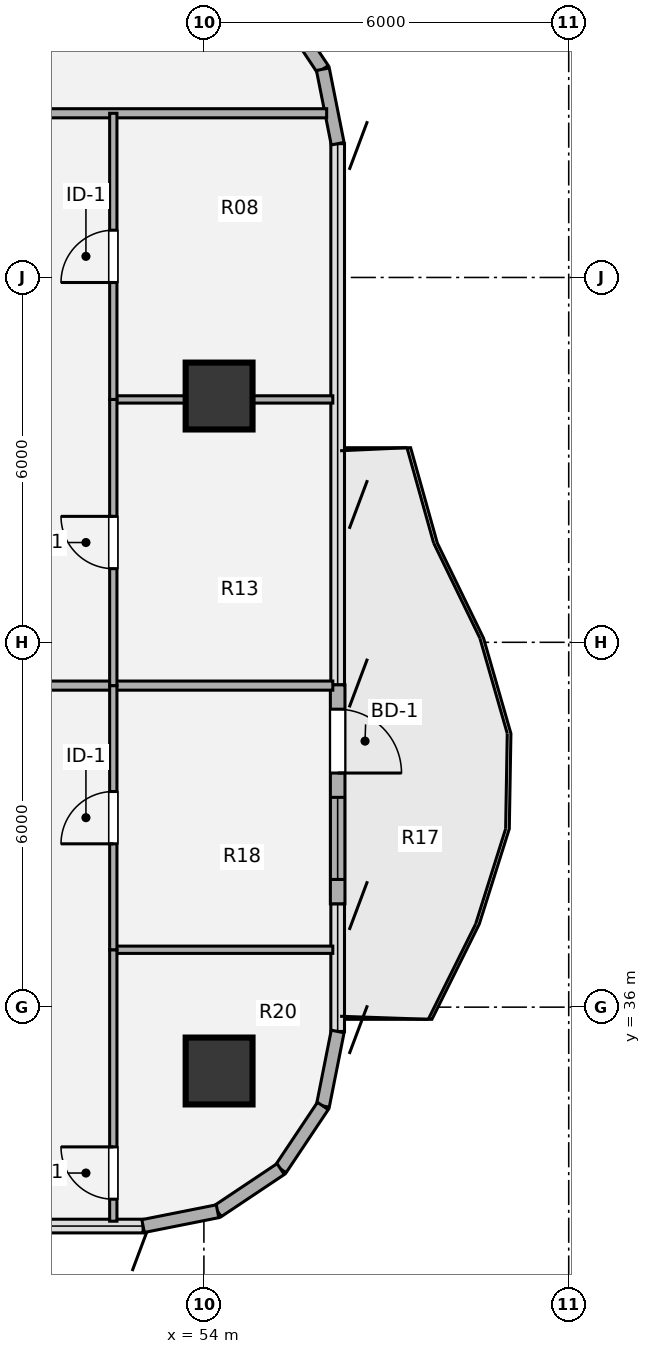
"""IFC4 building model, lengths in metres.
Left out: names, types, materials, properties, quantities, classifications, styles, units other than length and angle.
Written with IfcOpenShell. Run it as: python <this file> out.ifc"""

import sys

from ifc_helpers import new_model, si_unit, direction, frame, frame_2d, origin, origin_2d, place, context, subcontext, project, spatial, rectangle, hollow_circle, extrude, source, transform, mapped, element, fill, save


model = new_model("IFC4")
c1 = context("Model", 3, precision=1e-05, world=origin(), true_north=direction((0.0, 1.0)))
c2 = subcontext(c1, "Body", "Model", "MODEL_VIEW")
j1 = project(units=[si_unit("LENGTHUNIT", "METRE"), si_unit("PLANEANGLEUNIT", "RADIAN")], contexts=[c1])
p1 = place(None, origin())
s1 = spatial("IfcSite", under=j1, at=p1, CompositionType="ELEMENT")
p2 = place(p1, origin())
s2 = spatial("IfcBuilding", under=s1, at=p2, CompositionType="ELEMENT")
p3 = place(p2, frame((0.0, 0.0, 160.2)))
s3 = spatial("IfcBuildingStorey", under=s2, at=p3, CompositionType="ELEMENT", Elevation=160.2)
m1 = source(origin(), c2, "Body", "SweptSolid", [
    extrude(hollow_circle(Radius=0.55, WallThickness=0.04, at=origin_2d()), origin(), (0.0, 0.0, 1.0), 3.78),
])
for number, where, z_axis, x_axis in (
    (1, (54.25, 34.95, 0.0), (0.0, 0.0, 1.0), (1.0, 0.0, 0.0)),
    (2, (54.25, 46.05, 0.0), (0.0, 0.0, 1.0), (1.0, 0.0, 0.0)),
):
    element("IfcColumn", number, at=place(p3, frame(where, z_axis=z_axis, x_axis=x_axis)), inside=s3, PredefinedType="COLUMN", context=c2, shape_type="MappedRepresentation", body=[
        mapped(m1, transform((0.0, 0.0, 0.0), x_axis=(1.0, 0.0, 0.0), y_axis=(0.0, 1.0, 0.0), z_axis=(0.0, 0.0, 1.0), scale=1.0)),
    ])
for number, where, z_axis, x_axis in (
    (3, (55.263, 52.463, 0.0), (0.0, 0.0, 1.0), (0.556, -0.831, 0.0)),
    (4, (55.956, 51.425, 0.0), (0.0, 0.0, 1.0), (0.195, -0.981, 0.0)),
):
    element("IfcWall", number, at=place(p3, frame(where, z_axis=z_axis, x_axis=x_axis)), inside=s3, PredefinedType="SOLIDWALL", context=c2, shape_type="SweptSolid", body=[
        extrude(rectangle(XDim=1.249, YDim=0.215, at=frame_2d((0.624, 0.0))), origin(), (0.0, 0.0, 1.0), 3.53),
    ])
p4 = place(p3, frame((56.2, 41.3, 0.0), z_axis=(0.0, 0.0, 1.0), x_axis=(0.0, -1.0, 0.0)))
e5 = element("IfcWall", 5, at=p4, inside=s3, PredefinedType="SOLIDWALL", context=c2, shape_type="SweptSolid", body=[
    extrude(rectangle(XDim=3.6, YDim=0.24, at=frame_2d((1.8, 0.0))), origin(), (0.0, 0.0, 1.0), 3.53),
])
p5 = place(p4, frame((0.4, 0.0, 0.0)))
e6 = element("IfcOpeningElement", 6, at=p5, cuts=e5, PredefinedType="OPENING", context=c2, shape_type="SweptSolid", body=[
    extrude(rectangle(XDim=1.05, YDim=2.15, at=origin_2d()), frame((0.525, 0.13, 1.075), z_axis=(0.0, -1.0, 0.0), x_axis=(1.0, 0.0, 0.0)), (0.0, 0.0, 1.0), 0.26),
])
p6 = place(p4, frame((1.85, 0.0, 0.85)))
e7 = element("IfcOpeningElement", 7, at=p6, cuts=e5, PredefinedType="OPENING", context=c2, shape_type="SweptSolid", body=[
    extrude(rectangle(XDim=1.35, YDim=1.35, at=origin_2d()), frame((0.675, 0.13, 0.675), z_axis=(0.0, -1.0, 0.0), x_axis=(1.0, 0.0, 0.0)), (0.0, 0.0, 1.0), 0.26),
])
for number, where, z_axis, x_axis in (
    (8, (56.2, 35.6, 0.0), (0.0, 0.0, 1.0), (-0.195, -0.981, 0.0)),
    (9, (55.956, 34.375, 0.0), (0.0, 0.0, 1.0), (-0.556, -0.831, 0.0)),
    (10, (55.263, 33.337, 0.0), (0.0, 0.0, 1.0), (-0.831, -0.556, 0.0)),
    (11, (54.225, 32.644, 0.0), (0.0, 0.0, 1.0), (-0.981, -0.195, 0.0)),
):
    element("IfcWall", number, at=place(p3, frame(where, z_axis=z_axis, x_axis=x_axis)), inside=s3, PredefinedType="SOLIDWALL", context=c2, shape_type="SweptSolid", body=[
        extrude(rectangle(XDim=1.249, YDim=0.215, at=frame_2d((0.624, 0.0))), origin(), (0.0, 0.0, 1.0), 3.53),
    ])
p7 = place(p3, frame((52.51, 36.944, 0.0), z_axis=(0.0, 0.0, 1.0), x_axis=(1.0, 0.0, 0.0)))
e12 = element("IfcWall", 12, at=p7, inside=s3, PredefinedType="PARTITIONING", context=c2, shape_type="SweptSolid", body=[
    extrude(rectangle(XDim=3.61, YDim=0.12, at=frame_2d((1.805, 0.0))), origin(), (0.0, 0.0, 1.0), 2.982),
])
p8 = place(p3, frame((38.45, 41.288, 0.0), z_axis=(0.0, 0.0, 1.0), x_axis=(1.0, 0.0, 0.0)))
e13 = element("IfcWall", 13, at=p8, inside=s3, PredefinedType="PARTITIONING", context=c2, shape_type="SweptSolid", body=[
    extrude(rectangle(XDim=17.67, YDim=0.15, at=frame_2d((8.835, 0.0))), origin(), (0.0, 0.0, 1.0), 2.982),
])
p9 = place(p3, frame((52.51, 45.994, 0.0), z_axis=(0.0, 0.0, 1.0), x_axis=(1.0, 0.0, 0.0)))
e14 = element("IfcWall", 14, at=p9, inside=s3, PredefinedType="PARTITIONING", context=c2, shape_type="SweptSolid", body=[
    extrude(rectangle(XDim=3.61, YDim=0.12, at=frame_2d((1.805, 0.0))), origin(), (0.0, 0.0, 1.0), 2.903),
])
p10 = place(p3, frame((38.45, 50.7, 0.0), z_axis=(0.0, 0.0, 1.0), x_axis=(1.0, 0.0, 0.0)))
e15 = element("IfcWall", 15, at=p10, inside=s3, PredefinedType="PARTITIONING", context=c2, shape_type="SweptSolid", body=[
    extrude(rectangle(XDim=17.569, YDim=0.15, at=frame_2d((8.785, 0.0))), origin(), (0.0, 0.0, 1.0), 3.308),
])
p11 = place(p3, frame((52.51, 32.48, 0.0), z_axis=(0.0, 0.0, 1.0), x_axis=(0.0, 1.0, 0.0)))
e16 = element("IfcWall", 16, at=p11, inside=s3, PredefinedType="PARTITIONING", context=c2, shape_type="SweptSolid", body=[
    extrude(rectangle(XDim=4.464, YDim=0.12, at=frame_2d((2.232, 0.0))), origin(), (0.0, 0.0, 1.0), 3.5),
])
p12 = place(p11, frame((0.362, 0.0, 0.0)))
e17 = element("IfcOpeningElement", 17, at=p12, cuts=e16, PredefinedType="OPENING", context=c2, shape_type="SweptSolid", body=[
    extrude(rectangle(XDim=0.86, YDim=2.1, at=origin_2d()), frame((0.43, 0.07, 1.05), z_axis=(0.0, -1.0, 0.0), x_axis=(1.0, 0.0, 0.0)), (0.0, 0.0, 1.0), 0.14),
])
p13 = place(p3, frame((52.51, 36.944, 0.0), z_axis=(0.0, 0.0, 1.0), x_axis=(0.0, 1.0, 0.0)))
e18 = element("IfcWall", 18, at=p13, inside=s3, PredefinedType="PARTITIONING", context=c2, shape_type="SweptSolid", body=[
    extrude(rectangle(XDim=4.344, YDim=0.12, at=frame_2d((2.172, 0.0))), origin(), (0.0, 0.0, 1.0), 3.5),
])
p14 = place(p13, frame((1.742, 0.0, 0.0)))
e19 = element("IfcOpeningElement", 19, at=p14, cuts=e18, PredefinedType="OPENING", context=c2, shape_type="SweptSolid", body=[
    extrude(rectangle(XDim=0.86, YDim=2.1, at=origin_2d()), frame((0.43, 0.07, 1.05), z_axis=(0.0, -1.0, 0.0), x_axis=(1.0, 0.0, 0.0)), (0.0, 0.0, 1.0), 0.14),
])
p15 = place(p3, frame((52.51, 41.288, 0.0), z_axis=(0.0, 0.0, 1.0), x_axis=(0.0, 1.0, 0.0)))
e20 = element("IfcWall", 20, at=p15, inside=s3, PredefinedType="PARTITIONING", context=c2, shape_type="SweptSolid", body=[
    extrude(rectangle(XDim=4.706, YDim=0.12, at=frame_2d((2.353, 0.0))), origin(), (0.0, 0.0, 1.0), 3.5),
])
p16 = place(p15, frame((1.923, 0.0, 0.0)))
e21 = element("IfcOpeningElement", 21, at=p16, cuts=e20, PredefinedType="OPENING", context=c2, shape_type="SweptSolid", body=[
    extrude(rectangle(XDim=0.86, YDim=2.1, at=origin_2d()), frame((0.43, 0.07, 1.05), z_axis=(0.0, -1.0, 0.0), x_axis=(1.0, 0.0, 0.0)), (0.0, 0.0, 1.0), 0.14),
])
p17 = place(p3, frame((52.51, 45.994, 0.0), z_axis=(0.0, 0.0, 1.0), x_axis=(0.0, 1.0, 0.0)))
e22 = element("IfcWall", 22, at=p17, inside=s3, PredefinedType="PARTITIONING", context=c2, shape_type="SweptSolid", body=[
    extrude(rectangle(XDim=4.706, YDim=0.12, at=frame_2d((2.353, 0.0))), origin(), (0.0, 0.0, 1.0), 3.5),
])
p18 = place(p17, frame((1.923, 0.0, 0.0)))
e23 = element("IfcOpeningElement", 23, at=p18, cuts=e22, PredefinedType="OPENING", context=c2, shape_type="SweptSolid", body=[
    extrude(rectangle(XDim=0.86, YDim=2.1, at=origin_2d()), frame((0.43, 0.07, 1.05), z_axis=(0.0, -1.0, 0.0), x_axis=(1.0, 0.0, 0.0)), (0.0, 0.0, 1.0), 0.14),
])
m2 = source(origin(), c2, "Body", "SweptSolid", [
    extrude(rectangle(XDim=1.05, YDim=2.15, at=origin_2d()), frame((0.525, 0.025, 1.075), z_axis=(0.0, -1.0, 0.0), x_axis=(1.0, 0.0, 0.0)), (0.0, 0.0, 1.0), 0.05),
])
p19 = place(p5, origin())
e24 = element("IfcDoor", 24, at=p19, inside=s3, OperationType="SINGLE_SWING_RIGHT", PredefinedType="DOOR", context=c2, shape_type="MappedRepresentation", body=[
    mapped(m2, transform((0.0, 0.0, 0.0), x_axis=(1.0, 0.0, 0.0), y_axis=(0.0, 1.0, 0.0), z_axis=(0.0, 0.0, 1.0), scale=1.0)),
])
fill(e6, e24)
m3 = source(origin(), c2, "Body", "SweptSolid", [
    extrude(rectangle(XDim=1.35, YDim=1.35, at=origin_2d()), frame((0.675, 0.03, 0.675), z_axis=(0.0, -1.0, 0.0), x_axis=(1.0, 0.0, 0.0)), (0.0, 0.0, 1.0), 0.06),
])
p20 = place(p6, origin())
e25 = element("IfcWindow", 25, at=p20, inside=s3, PartitioningType="SINGLE_PANEL", PredefinedType="WINDOW", context=c2, shape_type="MappedRepresentation", body=[
    mapped(m3, transform((0.0, 0.0, 0.0), x_axis=(1.0, 0.0, 0.0), y_axis=(0.0, 1.0, 0.0), z_axis=(0.0, 0.0, 1.0), scale=1.0)),
])
fill(e7, e25)
m4 = source(origin(), c2, "Body", "SweptSolid", [
    extrude(rectangle(XDim=0.86, YDim=2.1, at=origin_2d()), frame((0.43, 0.025, 1.05), z_axis=(0.0, -1.0, 0.0), x_axis=(1.0, 0.0, 0.0)), (0.0, 0.0, 1.0), 0.05),
])
p21 = place(p12, origin())
e26 = element("IfcDoor", 26, at=p21, inside=s3, OperationType="SINGLE_SWING_RIGHT", PredefinedType="DOOR", context=c2, shape_type="MappedRepresentation", body=[
    mapped(m4, transform((0.0, 0.0, 0.0), x_axis=(1.0, 0.0, 0.0), y_axis=(0.0, 1.0, 0.0), z_axis=(0.0, 0.0, 1.0), scale=1.0)),
])
fill(e17, e26)
p22 = place(p14, origin())
e27 = element("IfcDoor", 27, at=p22, inside=s3, OperationType="SINGLE_SWING_LEFT", PredefinedType="DOOR", context=c2, shape_type="MappedRepresentation", body=[
    mapped(m4, transform((0.0, 0.0, 0.0), x_axis=(1.0, 0.0, 0.0), y_axis=(0.0, 1.0, 0.0), z_axis=(0.0, 0.0, 1.0), scale=1.0)),
])
fill(e19, e27)
p23 = place(p16, origin())
e28 = element("IfcDoor", 28, at=p23, inside=s3, OperationType="SINGLE_SWING_RIGHT", PredefinedType="DOOR", context=c2, shape_type="MappedRepresentation", body=[
    mapped(m4, transform((0.0, 0.0, 0.0), x_axis=(1.0, 0.0, 0.0), y_axis=(0.0, 1.0, 0.0), z_axis=(0.0, 0.0, 1.0), scale=1.0)),
])
fill(e21, e28)
p24 = place(p18, origin())
e29 = element("IfcDoor", 29, at=p24, inside=s3, OperationType="SINGLE_SWING_LEFT", PredefinedType="DOOR", context=c2, shape_type="MappedRepresentation", body=[
    mapped(m4, transform((0.0, 0.0, 0.0), x_axis=(1.0, 0.0, 0.0), y_axis=(0.0, 1.0, 0.0), z_axis=(0.0, 0.0, 1.0), scale=1.0)),
])
fill(e23, e29)
save(model, sys.argv[1])
